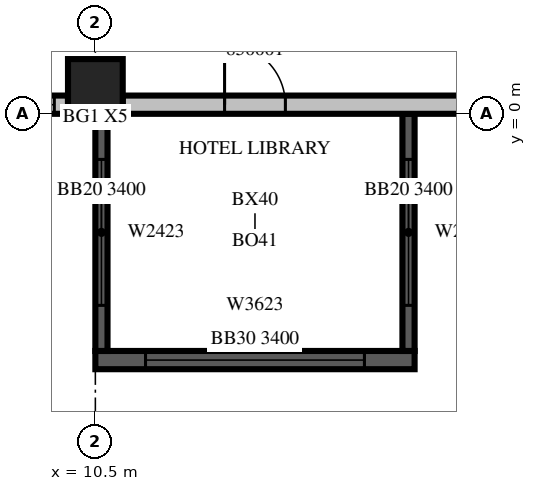
"""IFC4 building model, lengths in metres.
Left out: names, types, materials, properties, quantities, classifications, styles, units other than length and angle.
Written with IfcOpenShell. Run it as: python <this file> out.ifc"""

import sys

from ifc_helpers import new_model, si_unit, direction, frame, frame_2d, origin, origin_2d, place, context, subcontext, project, spatial, rectangle, extrude, source, transform, mapped, element, fill, save


model = new_model("IFC4")
c1 = context("Model", 3, precision=1e-05, world=origin(), true_north=direction((0.0, 1.0)))
c2 = subcontext(c1, "Body", "Model", "MODEL_VIEW")
j1 = project(units=[si_unit("LENGTHUNIT", "METRE"), si_unit("PLANEANGLEUNIT", "RADIAN")], contexts=[c1])
p1 = place(None, origin())
s1 = spatial("IfcSite", under=j1, at=p1, CompositionType="ELEMENT")
p2 = place(p1, origin())
s2 = spatial("IfcBuilding", under=s1, at=p2, CompositionType="ELEMENT")
p3 = place(p2, frame((0.0, 0.0, 223.4)))
s3 = spatial("IfcBuildingStorey", under=s2, at=p3, CompositionType="ELEMENT", Elevation=223.4)
m1 = source(origin(), c2, "Body", "SweptSolid", [
    extrude(rectangle(XDim=0.9, YDim=0.9, at=origin_2d()), origin(), (0.0, 0.0, 1.0), 3.8),
])
p4 = place(p3, frame((10.5, 0.45, 0.0), z_axis=(0.0, 0.0, 1.0), x_axis=(1.0, 0.0, 0.0)))
e1 = element("IfcColumn", 1, at=p4, inside=s3, PredefinedType="COLUMN", context=c2, shape_type="MappedRepresentation", body=[
    mapped(m1, transform((0.0, 0.0, 0.0), scale=1.0)),
])
m2 = source(origin(), c2, "Body", "SweptSolid", [
    extrude(rectangle(XDim=5.25, YDim=0.3, at=frame_2d((2.625, 0.0))), origin(), (0.0, 0.0, 1.0), 3.4),
])
p5 = place(p3, frame((10.5, -4.05, 0.0), z_axis=(0.0, 0.0, 1.0), x_axis=(1.0, 0.0, 0.0)))
e2 = element("IfcWall", 2, at=p5, inside=s3, PredefinedType="SOLIDWALL", context=c2, shape_type="MappedRepresentation", body=[
    mapped(m2, transform((0.0, 0.0, 0.0), scale=1.0)),
])
m3 = source(origin(), c2, "Body", "SweptSolid", [
    extrude(rectangle(XDim=3.6, YDim=2.3, at=frame_2d((1.8, 1.15))), frame((0.0, 0.16, 0.0), z_axis=(0.0, -1.0, 0.0), x_axis=(1.0, 0.0, 0.0)), (0.0, 0.0, 1.0), 0.32),
])
p6 = place(p5, frame((0.825, 0.0, 0.6)))
e3 = element("IfcOpeningElement", 3, at=p6, cuts=e2, PredefinedType="OPENING", context=c2, shape_type="MappedRepresentation", body=[
    mapped(m3, transform((0.0, 0.0, 0.0), scale=1.0)),
])
m4 = source(origin(), c2, "Body", "SweptSolid", [
    extrude(rectangle(XDim=3.9, YDim=0.2, at=frame_2d((1.95, 0.0))), origin(), (0.0, 0.0, 1.0), 3.4),
])
p7 = place(p3, frame((10.6, 0.0, 0.0), z_axis=(0.0, 0.0, 1.0), x_axis=(0.0, -1.0, 0.0)))
e4 = element("IfcWall", 4, at=p7, inside=s3, PredefinedType="SOLIDWALL", context=c2, shape_type="MappedRepresentation", body=[
    mapped(m4, transform((0.0, 0.0, 0.0), scale=1.0)),
])
m5 = source(origin(), c2, "Body", "SweptSolid", [
    extrude(rectangle(XDim=2.4, YDim=2.3, at=frame_2d((1.2, 1.15))), frame((0.0, 0.11, 0.0), z_axis=(0.0, -1.0, 0.0), x_axis=(1.0, 0.0, 0.0)), (0.0, 0.0, 1.0), 0.22),
])
p8 = place(p7, frame((0.75, 0.0, 0.6)))
e5 = element("IfcOpeningElement", 5, at=p8, cuts=e4, PredefinedType="OPENING", context=c2, shape_type="MappedRepresentation", body=[
    mapped(m5, transform((0.0, 0.0, 0.0), scale=1.0)),
])
p9 = place(p3, frame((15.65, 0.0, 0.0), z_axis=(0.0, 0.0, 1.0), x_axis=(0.0, -1.0, 0.0)))
e6 = element("IfcWall", 6, at=p9, inside=s3, PredefinedType="SOLIDWALL", context=c2, shape_type="MappedRepresentation", body=[
    mapped(m4, transform((0.0, 0.0, 0.0), scale=1.0)),
])
p10 = place(p9, frame((0.75, 0.0, 0.6)))
e7 = element("IfcOpeningElement", 7, at=p10, cuts=e6, PredefinedType="OPENING", context=c2, shape_type="MappedRepresentation", body=[
    mapped(m5, transform((0.0, 0.0, 0.0), scale=1.0)),
])
m6 = source(origin(), c2, "Body", "SweptSolid", [
    extrude(rectangle(XDim=2.7, YDim=0.3, at=frame_2d((1.35, 0.0))), origin(), (0.0, 0.0, 1.0), 3.4),
])
p11 = place(p3, frame((7.35, 0.15, 0.0), z_axis=(0.0, 0.0, 1.0), x_axis=(1.0, 0.0, 0.0)))
e8 = element("IfcWall", 8, at=p11, inside=s3, PredefinedType="STANDARD", context=c2, shape_type="MappedRepresentation", body=[
    mapped(m6, transform((0.0, 0.0, 0.0), scale=1.0)),
])
m7 = source(origin(), c2, "Body", "SweptSolid", [
    extrude(rectangle(XDim=1.8, YDim=2.3, at=frame_2d((0.9, 1.15))), frame((0.0, 0.16, 0.0), z_axis=(0.0, -1.0, 0.0), x_axis=(1.0, 0.0, 0.0)), (0.0, 0.0, 1.0), 0.32),
])
p12 = place(p11, frame((0.675, 0.0, 0.6)))
e9 = element("IfcOpeningElement", 9, at=p12, cuts=e8, PredefinedType="OPENING", context=c2, shape_type="MappedRepresentation", body=[
    mapped(m7, transform((0.0, 0.0, 0.0), scale=1.0)),
])
m8 = source(origin(), c2, "Body", "SweptSolid", [
    extrude(rectangle(XDim=9.6, YDim=0.3, at=frame_2d((4.8, 0.0))), origin(), (0.0, 0.0, 1.0), 3.4),
])
p13 = place(p3, frame((10.95, 0.15, 0.0), z_axis=(0.0, 0.0, 1.0), x_axis=(1.0, 0.0, 0.0)))
e10 = element("IfcWall", 10, at=p13, inside=s3, PredefinedType="STANDARD", context=c2, shape_type="MappedRepresentation", body=[
    mapped(m8, transform((0.0, 0.0, 0.0), scale=1.0)),
])
p14 = place(p13, frame((5.625, 0.0, 0.6)))
e11 = element("IfcOpeningElement", 11, at=p14, cuts=e10, PredefinedType="OPENING", context=c2, shape_type="MappedRepresentation", body=[
    mapped(m3, transform((0.0, 0.0, 0.0), scale=1.0)),
])
m9 = source(origin(), c2, "Body", "SweptSolid", [
    extrude(rectangle(XDim=1.0, YDim=2.1, at=frame_2d((0.5, 1.05))), frame((0.0, 0.16, 0.0), z_axis=(0.0, -1.0, 0.0), x_axis=(1.0, 0.0, 0.0)), (0.0, 0.0, 1.0), 0.32),
])
p15 = place(p13, frame((1.675, 0.0, 0.0)))
e12 = element("IfcOpeningElement", 12, at=p15, cuts=e10, PredefinedType="OPENING", context=c2, shape_type="MappedRepresentation", body=[
    mapped(m9, transform((0.0, 0.0, 0.0), scale=1.0)),
])
m10 = source(origin(), c2, "Body", "SweptSolid", [
    extrude(rectangle(XDim=3.6, YDim=2.3, at=frame_2d((1.8, 1.15))), frame((0.0, 0.03, 0.0), z_axis=(0.0, -1.0, 0.0), x_axis=(1.0, 0.0, 0.0)), (0.0, 0.0, 1.0), 0.06),
])
p16 = place(p6, origin())
e13 = element("IfcWindow", 13, at=p16, inside=s3, PartitioningType="SINGLE_PANEL", PredefinedType="WINDOW", context=c2, shape_type="MappedRepresentation", body=[
    mapped(m10, transform((0.0, 0.0, 0.0), scale=1.0)),
])
fill(e3, e13)
m11 = source(origin(), c2, "Body", "SweptSolid", [
    extrude(rectangle(XDim=2.4, YDim=2.3, at=frame_2d((1.2, 1.15))), frame((0.0, 0.03, 0.0), z_axis=(0.0, -1.0, 0.0), x_axis=(1.0, 0.0, 0.0)), (0.0, 0.0, 1.0), 0.06),
])
p17 = place(p8, origin())
e14 = element("IfcWindow", 14, at=p17, inside=s3, PartitioningType="SINGLE_PANEL", PredefinedType="WINDOW", context=c2, shape_type="MappedRepresentation", body=[
    mapped(m11, transform((0.0, 0.0, 0.0), scale=1.0)),
])
fill(e5, e14)
p18 = place(p10, origin())
e15 = element("IfcWindow", 15, at=p18, inside=s3, PartitioningType="SINGLE_PANEL", PredefinedType="WINDOW", context=c2, shape_type="MappedRepresentation", body=[
    mapped(m11, transform((0.0, 0.0, 0.0), scale=1.0)),
])
fill(e7, e15)
m12 = source(origin(), c2, "Body", "SweptSolid", [
    extrude(rectangle(XDim=1.8, YDim=2.3, at=frame_2d((0.9, 1.15))), frame((0.0, 0.03, 0.0), z_axis=(0.0, -1.0, 0.0), x_axis=(1.0, 0.0, 0.0)), (0.0, 0.0, 1.0), 0.06),
])
p19 = place(p12, origin())
e16 = element("IfcWindow", 16, at=p19, inside=s3, PartitioningType="SINGLE_PANEL", PredefinedType="WINDOW", context=c2, shape_type="MappedRepresentation", body=[
    mapped(m12, transform((0.0, 0.0, 0.0), scale=1.0)),
])
fill(e9, e16)
m13 = source(origin(), c2, "Body", "SweptSolid", [
    extrude(rectangle(XDim=1.0, YDim=2.1, at=frame_2d((0.5, 1.05))), frame((0.0, 0.025, 0.0), z_axis=(0.0, -1.0, 0.0), x_axis=(1.0, 0.0, 0.0)), (0.0, 0.0, 1.0), 0.05),
])
p20 = place(p15, origin())
e17 = element("IfcDoor", 17, at=p20, inside=s3, OperationType="SINGLE_SWING_LEFT", PredefinedType="DOOR", context=c2, shape_type="MappedRepresentation", body=[
    mapped(m13, transform((0.0, 0.0, 0.0), scale=1.0)),
])
fill(e12, e17)
save(model, sys.argv[1])
